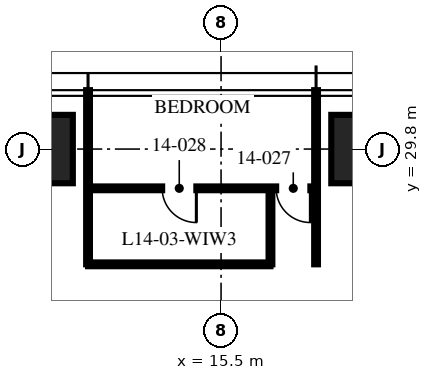
"""IFC4 building model, lengths in metres.
Left out: names, types, materials, properties, quantities, classifications, styles, units other than length and angle.
Written with IfcOpenShell. Run it as: python <this file> out.ifc"""

import sys

from ifc_helpers import new_model, si_unit, direction, frame, frame_2d, origin, origin_2d, place, context, subcontext, project, spatial, rectangle, hollow_rectangle, extrude, element, fill, save


model = new_model("IFC4")
c1 = context("Model", 3, precision=1e-05, world=origin(), true_north=direction((0.0, 1.0)))
c2 = subcontext(c1, "Body", "Model", "MODEL_VIEW")
j1 = project(units=[si_unit("LENGTHUNIT", "METRE"), si_unit("PLANEANGLEUNIT", "RADIAN")], contexts=[c1])
p1 = place(None, origin())
s1 = spatial("IfcSite", under=j1, at=p1, CompositionType="ELEMENT")
p2 = place(p1, origin())
s2 = spatial("IfcBuilding", under=s1, at=p2, CompositionType="ELEMENT")
p3 = place(p2, frame((0.0, 0.0, 58.5)))
s3 = spatial("IfcBuildingStorey", under=s2, at=p3, CompositionType="ELEMENT", Elevation=58.5)
for number, where, z_axis, x_axis in (
    (1, (10.0, 29.8, 0.0), (0.0, 0.0, 1.0), (1.0, 0.0, 0.0)),
    (2, (20.0, 29.8, 0.0), (0.0, 0.0, 1.0), (1.0, 0.0, 0.0)),
):
    element("IfcColumn", number, at=place(p3, frame(where, z_axis=z_axis, x_axis=x_axis)), inside=s3, PredefinedType="COLUMN", context=c2, shape_type="SweptSolid", body=[
        extrude(hollow_rectangle(XDim=3.2, YDim=1.8, WallThickness=0.2, at=origin_2d()), origin(), (0.0, 0.0, 1.0), 3.75),
    ])
for number, where, z_axis, x_axis in (
    (3, (18.0, 26.767, 0.0), (0.0, 0.0, 1.0), (0.0, 1.0, 0.0)),
    (4, (12.0, 26.767, 0.0), (0.0, 0.0, 1.0), (0.0, 1.0, 0.0)),
):
    element("IfcWall", number, at=place(p3, frame(where, z_axis=z_axis, x_axis=x_axis)), inside=s3, PredefinedType="PARTITIONING", context=c2, shape_type="SweptSolid", body=[
        extrude(rectangle(XDim=4.583, YDim=0.1, at=frame_2d((2.292, 0.0))), origin(), (0.0, 0.0, 1.0), 2.71),
    ])
p4 = place(p3, frame((18.0, 28.767, 0.0), z_axis=(0.0, 0.0, 1.0), x_axis=(-1.0, 0.0, 0.0)))
e5 = element("IfcWall", 5, at=p4, inside=s3, PredefinedType="PARTITIONING", context=c2, shape_type="SweptSolid", body=[
    extrude(rectangle(XDim=6.0, YDim=0.1, at=frame_2d((3.0, 0.0))), origin(), (0.0, 0.0, 1.0), 2.61),
])
p5 = place(p4, frame((0.15, 0.0, 0.0)))
e6 = element("IfcOpeningElement", 6, at=p5, cuts=e5, PredefinedType="OPENING", context=c2, shape_type="SweptSolid", body=[
    extrude(rectangle(XDim=0.9, YDim=2.1, at=frame_2d((0.45, 1.05))), frame((0.0, 0.06, 0.0), z_axis=(0.0, -1.0, 0.0), x_axis=(1.0, 0.0, 0.0)), (0.0, 0.0, 1.0), 0.12),
])
p6 = place(p4, frame((3.15, 0.0, 0.0)))
e7 = element("IfcOpeningElement", 7, at=p6, cuts=e5, PredefinedType="OPENING", context=c2, shape_type="SweptSolid", body=[
    extrude(rectangle(XDim=0.9, YDim=2.1, at=frame_2d((0.45, 1.05))), frame((0.0, 0.06, 0.0), z_axis=(0.0, -1.0, 0.0), x_axis=(1.0, 0.0, 0.0)), (0.0, 0.0, 1.0), 0.12),
])
p7 = place(p3, frame((16.8, 26.767, 0.0), z_axis=(0.0, 0.0, 1.0), x_axis=(0.0, 1.0, 0.0)))
e8 = element("IfcWall", 8, at=p7, inside=s3, PredefinedType="PARTITIONING", context=c2, shape_type="SweptSolid", body=[
    extrude(rectangle(XDim=2.0, YDim=0.1, at=frame_2d((1.0, 0.0))), origin(), (0.0, 0.0, 1.0), 3.5),
])
p8 = place(p3, frame((16.8, 26.767, 0.0), z_axis=(0.0, 0.0, 1.0), x_axis=(-1.0, 0.0, 0.0)))
e9 = element("IfcWall", 9, at=p8, inside=s3, PredefinedType="PARTITIONING", context=c2, shape_type="SweptSolid", body=[
    extrude(rectangle(XDim=4.8, YDim=0.1, at=frame_2d((2.4, 0.0))), origin(), (0.0, 0.0, 1.0), 2.61),
])
p9 = place(p5, origin())
e10 = element("IfcDoor", 10, at=p9, inside=s3, OperationType="SINGLE_SWING_LEFT", PredefinedType="DOOR", context=c2, shape_type="SweptSolid", body=[
    extrude(rectangle(XDim=0.9, YDim=2.1, at=frame_2d((0.45, 1.05))), frame((0.0, 0.025, 0.0), z_axis=(0.0, -1.0, 0.0), x_axis=(1.0, 0.0, 0.0)), (0.0, 0.0, 1.0), 0.05),
])
fill(e6, e10)
p10 = place(p6, origin())
e11 = element("IfcDoor", 11, at=p10, inside=s3, OperationType="SINGLE_SWING_LEFT", PredefinedType="DOOR", context=c2, shape_type="SweptSolid", body=[
    extrude(rectangle(XDim=0.9, YDim=2.1, at=frame_2d((0.45, 1.05))), frame((0.0, 0.025, 0.0), z_axis=(0.0, -1.0, 0.0), x_axis=(1.0, 0.0, 0.0)), (0.0, 0.0, 1.0), 0.05),
])
fill(e7, e11)
save(model, sys.argv[1])
